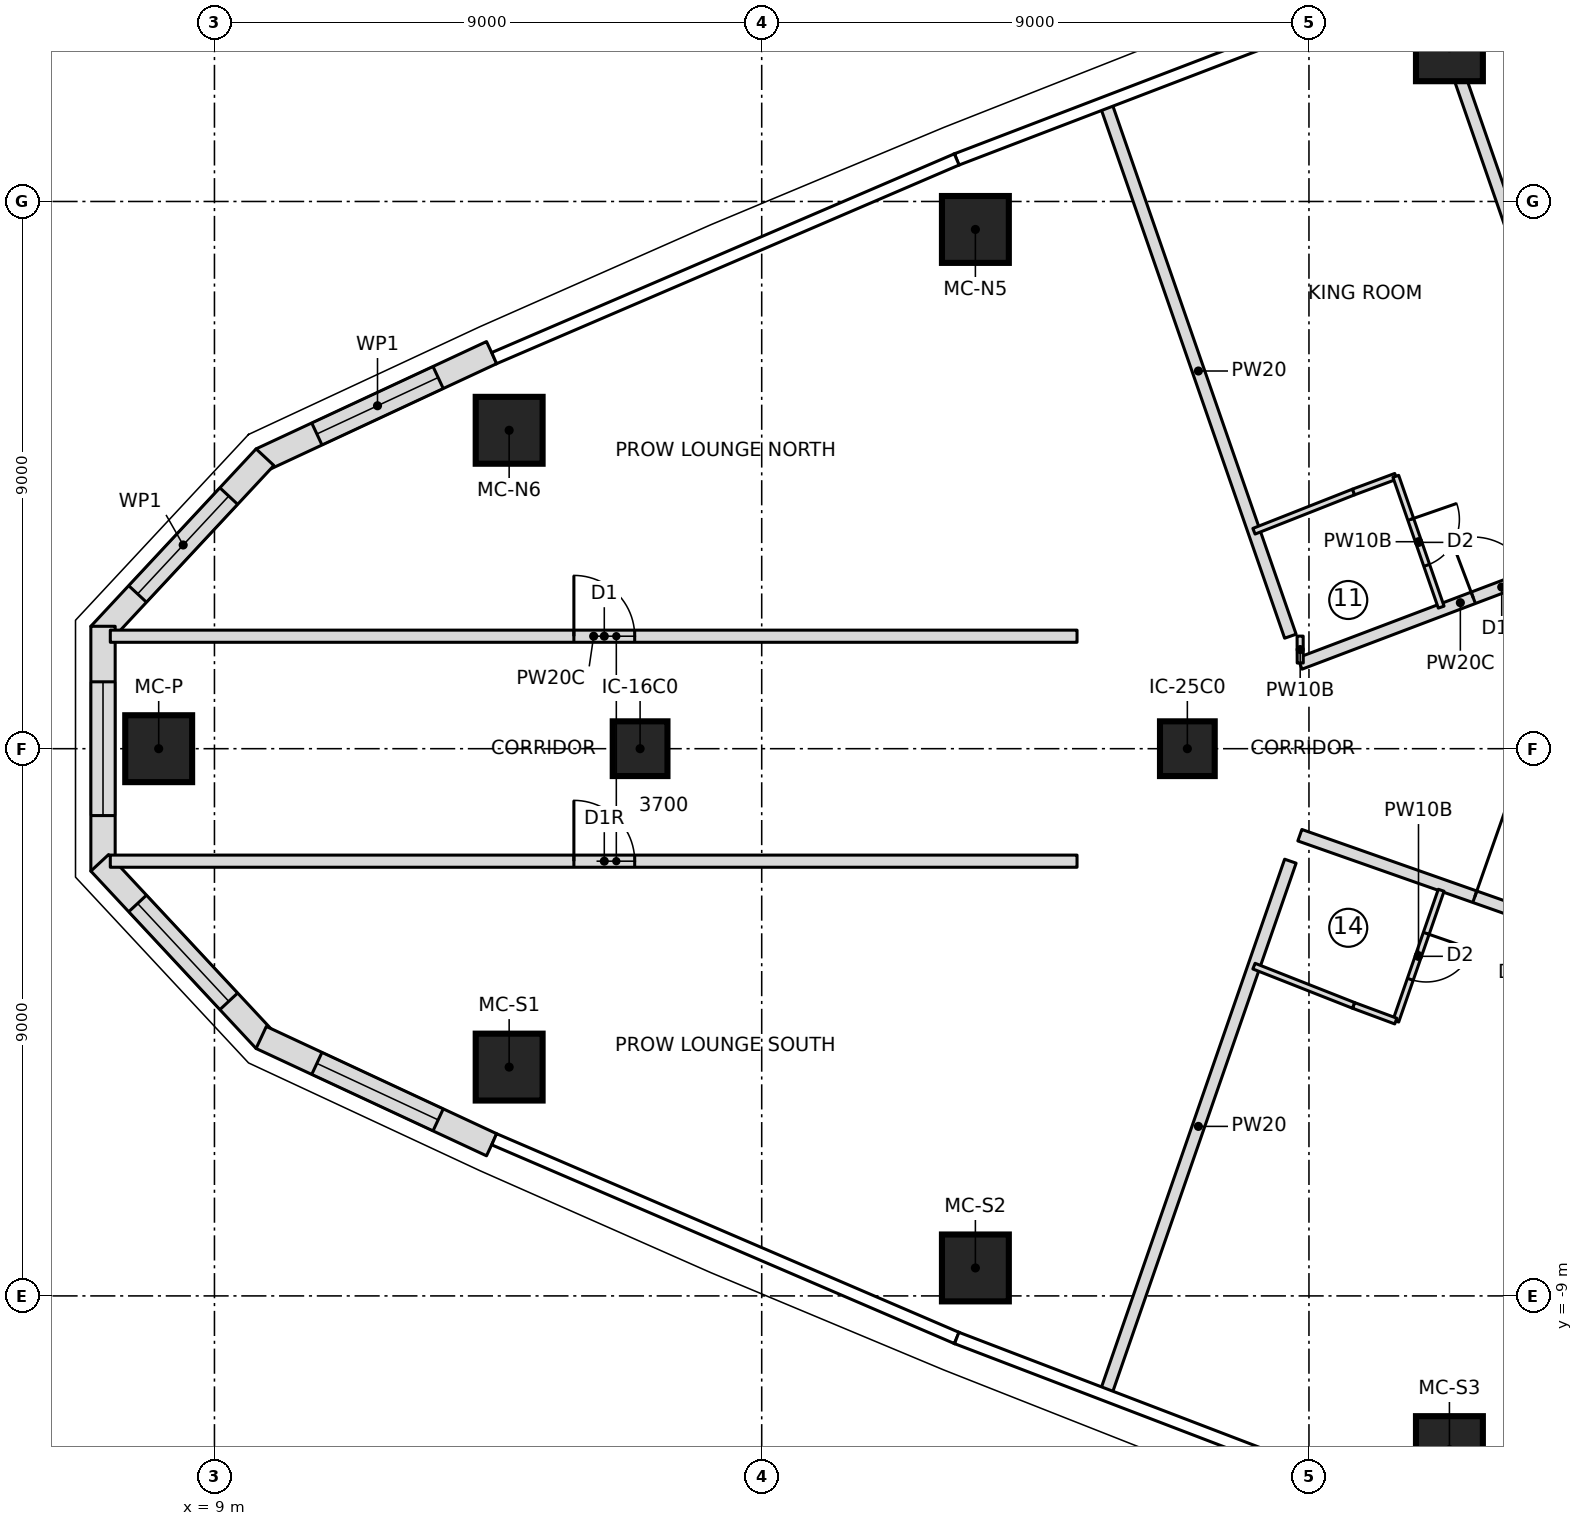
"""IFC4 building model, lengths in metres.
Left out: names, types, materials, properties, quantities, classifications, styles, units other than length and angle.
Written with IfcOpenShell. Run it as: python <this file> out.ifc"""

import sys

from ifc_helpers import new_model, si_unit, direction, frame, frame_2d, origin, origin_2d, place, context, subcontext, project, spatial, polyline, rectangle, outline, extrude, element, fill, save


model = new_model("IFC4")
c1 = context("Model", 3, precision=1e-05, world=origin(), true_north=direction((0.0, 1.0)))
c2 = subcontext(c1, "Body", "Model", "MODEL_VIEW")
j1 = project(units=[si_unit("LENGTHUNIT", "METRE"), si_unit("PLANEANGLEUNIT", "RADIAN")], contexts=[c1])
p1 = place(None, origin())
s1 = spatial("IfcSite", under=j1, at=p1, CompositionType="ELEMENT")
p2 = place(p1, origin())
s2 = spatial("IfcBuilding", under=s1, at=p2, CompositionType="ELEMENT")
p3 = place(p2, frame((0.0, 0.0, 285.65)))
s3 = spatial("IfcBuildingStorey", under=s2, at=p3, CompositionType="ELEMENT", Elevation=285.65)
for number, where, z_axis, x_axis in (
    (1, (8.083, 0.0, 0.0), (0.0, 0.0, 1.0), (1.0, 0.0, 0.0)),
    (2, (13.846, -5.237, 0.0), (0.0, 0.0, 1.0), (1.0, 0.0, 0.0)),
    (3, (21.514, -8.54, 0.0), (0.0, 0.0, 1.0), (1.0, 0.0, 0.0)),
    (4, (29.31, -11.528, 0.0), (0.0, 0.0, 1.0), (1.0, 0.0, 0.0)),
    (5, (29.31, 11.528, 0.0), (0.0, 0.0, 1.0), (1.0, 0.0, 0.0)),
    (6, (21.514, 8.54, 0.0), (0.0, 0.0, 1.0), (1.0, 0.0, 0.0)),
    (7, (13.846, 5.237, 0.0), (0.0, 0.0, 1.0), (1.0, 0.0, 0.0)),
):
    element("IfcColumn", number, at=place(p3, frame(where, z_axis=z_axis, x_axis=x_axis)), inside=s3, PredefinedType="COLUMN", context=c2, shape_type="SweptSolid", body=[
        extrude(rectangle(XDim=1.1, YDim=1.1, at=origin_2d()), origin(), (0.0, 0.0, 1.0), 3.55),
    ])
for number, where, z_axis, x_axis in (
    (8, (16.0, 0.0, 0.0), (0.0, 0.0, 1.0), (1.0, 0.0, 0.0)),
    (9, (25.0, 0.0, 0.0), (0.0, 0.0, 1.0), (1.0, 0.0, 0.0)),
):
    element("IfcColumn", number, at=place(p3, frame(where, z_axis=z_axis, x_axis=x_axis)), inside=s3, PredefinedType="COLUMN", context=c2, shape_type="SweptSolid", body=[
        extrude(rectangle(XDim=0.9, YDim=0.9, at=origin_2d()), origin(), (0.0, 0.0, 1.0), 3.55),
    ])
p4 = place(p3, frame((13.559, 6.515, 0.0), z_axis=(0.0, 0.0, 1.0), x_axis=(-0.906485602396, -0.42223672584, 0.0)))
e10 = element("IfcWall", 10, at=p4, inside=s3, PredefinedType="NOTDEFINED", context=c2, shape_type="SweptSolid", body=[
    extrude(outline(polyline([(0.0, -0.2), (4.181, -0.2), (4.103, 0.2), (0.0, 0.2), (0.0, -0.2)])), origin(), (0.0, 0.0, 1.0), 3.25),
])
p5 = place(p4, frame((0.971, 0.0, 0.6)))
e11 = element("IfcOpeningElement", 11, at=p5, cuts=e10, PredefinedType="OPENING", context=c2, shape_type="SweptSolid", body=[
    extrude(outline(polyline([(0.0, 1.35), (0.084, 1.771), (0.322, 2.128), (0.679, 2.366), (1.1, 2.45), (1.521, 2.366), (1.878, 2.128), (2.116, 1.771), (2.2, 1.35), (2.2, 1.1), (2.116, 0.679), (1.878, 0.322), (1.521, 0.084), (1.1, 0.0), (0.679, 0.084), (0.322, 0.322), (0.084, 0.679), (0.0, 1.1), (0.0, 1.35)])), frame((0.0, 0.21, 0.0), z_axis=(0.0, -1.0, 0.0), x_axis=(1.0, 0.0, 0.0)), (0.0, 0.0, 1.0), 0.42),
])
p6 = place(p3, frame((9.804, 4.766, 0.0), z_axis=(0.0, 0.0, 1.0), x_axis=(-0.6815467277, -0.73177459505, 0.0)))
e12 = element("IfcWall", 12, at=p6, inside=s3, PredefinedType="NOTDEFINED", context=c2, shape_type="SweptSolid", body=[
    extrude(outline(polyline([(-0.039, -0.2), (3.948, -0.2), (3.791, 0.2), (0.039, 0.2), (-0.039, -0.2)])), origin(), (0.0, 0.0, 1.0), 3.25),
])
p7 = place(p6, frame((0.835, 0.0, 0.6)))
e13 = element("IfcOpeningElement", 13, at=p7, cuts=e12, PredefinedType="OPENING", context=c2, shape_type="SweptSolid", body=[
    extrude(outline(polyline([(0.0, 1.35), (0.084, 1.771), (0.322, 2.128), (0.679, 2.366), (1.1, 2.45), (1.521, 2.366), (1.878, 2.128), (2.116, 1.771), (2.2, 1.35), (2.2, 1.1), (2.116, 0.679), (1.878, 0.322), (1.521, 0.084), (1.1, 0.0), (0.679, 0.084), (0.322, 0.322), (0.084, 0.679), (0.0, 1.1), (0.0, 1.35)])), frame((0.0, 0.21, 0.0), z_axis=(0.0, -1.0, 0.0), x_axis=(1.0, 0.0, 0.0)), (0.0, 0.0, 1.0), 0.42),
])
p8 = place(p3, frame((7.167, 1.935, 0.0), z_axis=(0.0, 0.0, 1.0), x_axis=(0.0, -1.0, 0.0)))
e14 = element("IfcWall", 14, at=p8, inside=s3, PredefinedType="NOTDEFINED", context=c2, shape_type="SweptSolid", body=[
    extrude(outline(polyline([(-0.079, -0.2), (3.948, -0.2), (3.791, 0.2), (0.079, 0.2), (-0.079, -0.2)])), origin(), (0.0, 0.0, 1.0), 3.25),
])
p9 = place(p8, frame((0.835, 0.0, 0.6)))
e15 = element("IfcOpeningElement", 15, at=p9, cuts=e14, PredefinedType="OPENING", context=c2, shape_type="SweptSolid", body=[
    extrude(outline(polyline([(0.0, 1.35), (0.084, 1.771), (0.322, 2.128), (0.679, 2.366), (1.1, 2.45), (1.521, 2.366), (1.878, 2.128), (2.116, 1.771), (2.2, 1.35), (2.2, 1.1), (2.116, 0.679), (1.878, 0.322), (1.521, 0.084), (1.1, 0.0), (0.679, 0.084), (0.322, 0.322), (0.084, 0.679), (0.0, 1.1), (0.0, 1.35)])), frame((0.0, 0.21, 0.0), z_axis=(0.0, -1.0, 0.0), x_axis=(1.0, 0.0, 0.0)), (0.0, 0.0, 1.0), 0.42),
])
p10 = place(p3, frame((7.167, -1.935, 0.0), z_axis=(0.0, 0.0, 1.0), x_axis=(0.6815467277, -0.73177459505, 0.0)))
e16 = element("IfcWall", 16, at=p10, inside=s3, PredefinedType="NOTDEFINED", context=c2, shape_type="SweptSolid", body=[
    extrude(outline(polyline([(-0.079, -0.2), (3.908, -0.2), (3.83, 0.2), (0.079, 0.2), (-0.079, -0.2)])), origin(), (0.0, 0.0, 1.0), 3.25),
])
p11 = place(p10, frame((0.835, 0.0, 0.6)))
e17 = element("IfcOpeningElement", 17, at=p11, cuts=e16, PredefinedType="OPENING", context=c2, shape_type="SweptSolid", body=[
    extrude(outline(polyline([(0.0, 1.35), (0.084, 1.771), (0.322, 2.128), (0.679, 2.366), (1.1, 2.45), (1.521, 2.366), (1.878, 2.128), (2.116, 1.771), (2.2, 1.35), (2.2, 1.1), (2.116, 0.679), (1.878, 0.322), (1.521, 0.084), (1.1, 0.0), (0.679, 0.084), (0.322, 0.322), (0.084, 0.679), (0.0, 1.1), (0.0, 1.35)])), frame((0.0, 0.21, 0.0), z_axis=(0.0, -1.0, 0.0), x_axis=(1.0, 0.0, 0.0)), (0.0, 0.0, 1.0), 0.42),
])
p12 = place(p3, frame((9.804, -4.766, 0.0), z_axis=(0.0, 0.0, 1.0), x_axis=(0.906485602396, -0.42223672584, 0.0)))
e18 = element("IfcWall", 18, at=p12, inside=s3, PredefinedType="NOTDEFINED", context=c2, shape_type="SweptSolid", body=[
    extrude(outline(polyline([(-0.039, -0.2), (4.142, -0.2), (4.142, 0.2), (0.039, 0.2), (-0.039, -0.2)])), origin(), (0.0, 0.0, 1.0), 3.25),
])
p13 = place(p12, frame((0.971, 0.0, 0.6)))
e19 = element("IfcOpeningElement", 19, at=p13, cuts=e18, PredefinedType="OPENING", context=c2, shape_type="SweptSolid", body=[
    extrude(outline(polyline([(0.0, 1.35), (0.084, 1.771), (0.322, 2.128), (0.679, 2.366), (1.1, 2.45), (1.521, 2.366), (1.878, 2.128), (2.116, 1.771), (2.2, 1.35), (2.2, 1.1), (2.116, 0.679), (1.878, 0.322), (1.521, 0.084), (1.1, 0.0), (0.679, 0.084), (0.322, 0.322), (0.084, 0.679), (0.0, 1.1), (0.0, 1.35)])), frame((0.0, 0.21, 0.0), z_axis=(0.0, -1.0, 0.0), x_axis=(1.0, 0.0, 0.0)), (0.0, 0.0, 1.0), 0.42),
])
p14 = place(p3, frame((7.287, 1.85, 0.0), z_axis=(0.0, 0.0, 1.0), x_axis=(1.0, 0.0, 0.0)))
e20 = element("IfcWall", 20, at=p14, inside=s3, PredefinedType="PARTITIONING", context=c2, shape_type="SweptSolid", body=[
    extrude(rectangle(XDim=15.899, YDim=0.2, at=frame_2d((7.949, 0.0))), origin(), (0.0, 0.0, 1.0), 3.25),
])
p15 = place(p14, frame((7.624, 0.0, 0.0)))
e21 = element("IfcOpeningElement", 21, at=p15, cuts=e20, PredefinedType="OPENING", context=c2, shape_type="SweptSolid", body=[
    extrude(rectangle(XDim=1.0, YDim=2.1, at=frame_2d((0.5, 1.05))), frame((0.0, 0.11, 0.0), z_axis=(0.0, -1.0, 0.0), x_axis=(1.0, 0.0, 0.0)), (0.0, 0.0, 1.0), 0.22),
])
p16 = place(p3, frame((7.287, -1.85, 0.0), z_axis=(0.0, 0.0, 1.0), x_axis=(1.0, 0.0, 0.0)))
e22 = element("IfcWall", 22, at=p16, inside=s3, PredefinedType="PARTITIONING", context=c2, shape_type="SweptSolid", body=[
    extrude(rectangle(XDim=15.899, YDim=0.2, at=frame_2d((7.949, 0.0))), origin(), (0.0, 0.0, 1.0), 3.25),
])
p17 = place(p16, frame((7.624, 0.0, 0.0)))
e23 = element("IfcOpeningElement", 23, at=p17, cuts=e22, PredefinedType="OPENING", context=c2, shape_type="SweptSolid", body=[
    extrude(rectangle(XDim=1.0, YDim=2.1, at=frame_2d((0.5, 1.05))), frame((0.0, 0.11, 0.0), z_axis=(0.0, -1.0, 0.0), x_axis=(1.0, 0.0, 0.0)), (0.0, 0.0, 1.0), 0.22),
])
p18 = place(p3, frame((26.694, 1.85, 0.0), z_axis=(0.0, 0.0, 1.0), x_axis=(-0.327714422317, 0.944776829418, 0.0)))
e24 = element("IfcWall", 24, at=p18, inside=s3, PredefinedType="PARTITIONING", context=c2, shape_type="SweptSolid", body=[
    extrude(rectangle(XDim=9.233, YDim=0.2, at=frame_2d((4.617, 0.0))), origin(), (0.0, 0.0, 1.0), 3.25),
])
p19 = place(p3, frame((26.85, 1.401, 0.0), z_axis=(0.0, 0.0, 1.0), x_axis=(0.935181367748, 0.354169181912, 0.0)))
e25 = element("IfcWall", 25, at=p19, inside=s3, PredefinedType="PARTITIONING", context=c2, shape_type="SweptSolid", body=[
    extrude(rectangle(XDim=5.645, YDim=0.2, at=frame_2d((2.823, 0.0))), origin(), (0.0, 0.0, 1.0), 3.25),
])
p20 = place(p19, frame((3.05, 0.0, 0.0)))
e26 = element("IfcOpeningElement", 26, at=p20, cuts=e25, PredefinedType="OPENING", context=c2, shape_type="SweptSolid", body=[
    extrude(rectangle(XDim=1.0, YDim=2.1, at=frame_2d((0.5, 1.05))), frame((0.0, 0.11, 0.0), z_axis=(0.0, -1.0, 0.0), x_axis=(1.0, 0.0, 0.0)), (0.0, 0.0, 1.0), 0.22),
])
p21 = place(p3, frame((26.096, 3.576, 0.0), z_axis=(0.0, 0.0, 1.0), x_axis=(0.930254925629, 0.366913850028, 0.0)))
e27 = element("IfcWall", 27, at=p21, inside=s3, PredefinedType="PARTITIONING", context=c2, shape_type="SweptSolid", body=[
    extrude(rectangle(XDim=1.76, YDim=0.1, at=frame_2d((0.88, 0.0))), origin(), (0.0, 0.0, 1.0), 3.25),
])
p22 = place(p3, frame((27.733, 4.222, 0.0), z_axis=(0.0, 0.0, 1.0), x_axis=(0.937514267289, 0.347946833049, 0.0)))
e28 = element("IfcWall", 28, at=p22, inside=s3, PredefinedType="PARTITIONING", context=c2, shape_type="SweptSolid", body=[
    extrude(rectangle(XDim=0.742, YDim=0.1, at=frame_2d((0.371, 0.0))), origin(), (0.0, 0.0, 1.0), 3.25),
])
p23 = place(p3, frame((28.428, 4.48, 0.0), z_axis=(0.0, 0.0, 1.0), x_axis=(0.327718024288, -0.944775579996, 0.0)))
e29 = element("IfcWall", 29, at=p23, inside=s3, PredefinedType="PARTITIONING", context=c2, shape_type="SweptSolid", body=[
    extrude(rectangle(XDim=2.277, YDim=0.1, at=frame_2d((1.139, 0.0))), origin(), (0.0, 0.0, 1.0), 3.25),
])
p24 = place(p23, frame((0.75, 0.0, 0.0)))
e30 = element("IfcOpeningElement", 30, at=p24, cuts=e29, PredefinedType="OPENING", context=c2, shape_type="SweptSolid", body=[
    extrude(rectangle(XDim=0.8, YDim=2.1, at=frame_2d((0.4, 1.05))), frame((0.0, 0.06, 0.0), z_axis=(0.0, -1.0, 0.0), x_axis=(1.0, 0.0, 0.0)), (0.0, 0.0, 1.0), 0.12),
])
p25 = place(p3, frame((32.129, 3.401, 0.0), z_axis=(0.0, 0.0, 1.0), x_axis=(-0.327724115377, 0.944773467134, 0.0)))
e31 = element("IfcWall", 31, at=p25, inside=s3, PredefinedType="PARTITIONING", context=c2, shape_type="SweptSolid", body=[
    extrude(rectangle(XDim=9.702, YDim=0.2, at=frame_2d((4.851, 0.0))), origin(), (0.0, 0.0, 1.0), 3.25),
])
p26 = place(p3, frame((23.668, -10.573, 0.0), z_axis=(0.0, 0.0, 1.0), x_axis=(0.327714422317, 0.944776829418, 0.0)))
e32 = element("IfcWall", 32, at=p26, inside=s3, PredefinedType="PARTITIONING", context=c2, shape_type="SweptSolid", body=[
    extrude(rectangle(XDim=9.233, YDim=0.2, at=frame_2d((4.617, 0.0))), origin(), (0.0, 0.0, 1.0), 3.25),
])
p27 = place(p3, frame((26.85, -1.423, 0.0), z_axis=(0.0, 0.0, 1.0), x_axis=(0.943328585164, -0.331860182022, 0.0)))
e33 = element("IfcWall", 33, at=p27, inside=s3, PredefinedType="PARTITIONING", context=c2, shape_type="SweptSolid", body=[
    extrude(rectangle(XDim=13.984, YDim=0.2, at=frame_2d((6.992, 0.0))), origin(), (0.0, 0.0, 1.0), 3.25),
])
p28 = place(p27, frame((3.05, 0.0, 0.0)))
e34 = element("IfcOpeningElement", 34, at=p28, cuts=e33, PredefinedType="OPENING", context=c2, shape_type="SweptSolid", body=[
    extrude(rectangle(XDim=1.5, YDim=2.1, at=frame_2d((0.75, 1.05))), frame((0.0, 0.11, 0.0), z_axis=(0.0, -1.0, 0.0), x_axis=(1.0, 0.0, 0.0)), (0.0, 0.0, 1.0), 0.22),
])
p29 = place(p3, frame((29.175, -2.328, 0.0), z_axis=(0.0, 0.0, 1.0), x_axis=(-0.327718024288, -0.944775579996, 0.0)))
e35 = element("IfcWall", 35, at=p29, inside=s3, PredefinedType="PARTITIONING", context=c2, shape_type="SweptSolid", body=[
    extrude(rectangle(XDim=2.277, YDim=0.1, at=frame_2d((1.139, 0.0))), origin(), (0.0, 0.0, 1.0), 3.25),
])
p30 = place(p29, frame((0.75, 0.0, 0.0)))
e36 = element("IfcOpeningElement", 36, at=p30, cuts=e35, PredefinedType="OPENING", context=c2, shape_type="SweptSolid", body=[
    extrude(rectangle(XDim=0.8, YDim=2.1, at=frame_2d((0.4, 1.05))), frame((0.0, 0.06, 0.0), z_axis=(0.0, -1.0, 0.0), x_axis=(1.0, 0.0, 0.0)), (0.0, 0.0, 1.0), 0.12),
])
p31 = place(p3, frame((28.428, -4.48, 0.0), z_axis=(0.0, 0.0, 1.0), x_axis=(-0.937514267289, 0.347946833049, 0.0)))
e37 = element("IfcWall", 37, at=p31, inside=s3, PredefinedType="PARTITIONING", context=c2, shape_type="SweptSolid", body=[
    extrude(rectangle(XDim=0.742, YDim=0.1, at=frame_2d((0.371, 0.0))), origin(), (0.0, 0.0, 1.0), 3.25),
])
p32 = place(p3, frame((27.733, -4.222, 0.0), z_axis=(0.0, 0.0, 1.0), x_axis=(-0.930254925629, 0.366913850028, 0.0)))
e38 = element("IfcWall", 38, at=p32, inside=s3, PredefinedType="PARTITIONING", context=c2, shape_type="SweptSolid", body=[
    extrude(rectangle(XDim=1.76, YDim=0.1, at=frame_2d((0.88, 0.0))), origin(), (0.0, 0.0, 1.0), 3.25),
])
p33 = place(p3, frame((26.856, 1.409, 0.0), z_axis=(0.0, 0.0, 1.0), x_axis=(-0.003863105832, 0.999992538179, 0.0)))
e39 = element("IfcWall", 39, at=p33, inside=s3, PredefinedType="PARTITIONING", context=c2, shape_type="SweptSolid", body=[
    extrude(rectangle(XDim=0.442, YDim=0.1, at=frame_2d((0.221, 0.0))), origin(), (0.0, 0.0, 1.0), 3.25),
])
p34 = place(p5, origin())
e40 = element("IfcWindow", 40, at=p34, inside=s3, PartitioningType="SINGLE_PANEL", PredefinedType="WINDOW", context=c2, shape_type="SweptSolid", body=[
    extrude(outline(polyline([(0.0, 1.35), (0.084, 1.771), (0.322, 2.128), (0.679, 2.366), (1.1, 2.45), (1.521, 2.366), (1.878, 2.128), (2.116, 1.771), (2.2, 1.35), (2.2, 1.1), (2.116, 0.679), (1.878, 0.322), (1.521, 0.084), (1.1, 0.0), (0.679, 0.084), (0.322, 0.322), (0.084, 0.679), (0.0, 1.1), (0.0, 1.35)])), frame((0.0, 0.17, 0.0), z_axis=(0.0, -1.0, 0.0), x_axis=(1.0, 0.0, 0.0)), (0.0, 0.0, 1.0), 0.06),
])
fill(e11, e40)
p35 = place(p7, origin())
e41 = element("IfcWindow", 41, at=p35, inside=s3, PartitioningType="SINGLE_PANEL", PredefinedType="WINDOW", context=c2, shape_type="SweptSolid", body=[
    extrude(outline(polyline([(0.0, 1.35), (0.084, 1.771), (0.322, 2.128), (0.679, 2.366), (1.1, 2.45), (1.521, 2.366), (1.878, 2.128), (2.116, 1.771), (2.2, 1.35), (2.2, 1.1), (2.116, 0.679), (1.878, 0.322), (1.521, 0.084), (1.1, 0.0), (0.679, 0.084), (0.322, 0.322), (0.084, 0.679), (0.0, 1.1), (0.0, 1.35)])), frame((0.0, 0.17, 0.0), z_axis=(0.0, -1.0, 0.0), x_axis=(1.0, 0.0, 0.0)), (0.0, 0.0, 1.0), 0.06),
])
fill(e13, e41)
p36 = place(p9, origin())
e42 = element("IfcWindow", 42, at=p36, inside=s3, PartitioningType="SINGLE_PANEL", PredefinedType="WINDOW", context=c2, shape_type="SweptSolid", body=[
    extrude(outline(polyline([(0.0, 1.35), (0.084, 1.771), (0.322, 2.128), (0.679, 2.366), (1.1, 2.45), (1.521, 2.366), (1.878, 2.128), (2.116, 1.771), (2.2, 1.35), (2.2, 1.1), (2.116, 0.679), (1.878, 0.322), (1.521, 0.084), (1.1, 0.0), (0.679, 0.084), (0.322, 0.322), (0.084, 0.679), (0.0, 1.1), (0.0, 1.35)])), frame((0.0, 0.17, 0.0), z_axis=(0.0, -1.0, 0.0), x_axis=(1.0, 0.0, 0.0)), (0.0, 0.0, 1.0), 0.06),
])
fill(e15, e42)
p37 = place(p11, origin())
e43 = element("IfcWindow", 43, at=p37, inside=s3, PartitioningType="SINGLE_PANEL", PredefinedType="WINDOW", context=c2, shape_type="SweptSolid", body=[
    extrude(outline(polyline([(0.0, 1.35), (0.084, 1.771), (0.322, 2.128), (0.679, 2.366), (1.1, 2.45), (1.521, 2.366), (1.878, 2.128), (2.116, 1.771), (2.2, 1.35), (2.2, 1.1), (2.116, 0.679), (1.878, 0.322), (1.521, 0.084), (1.1, 0.0), (0.679, 0.084), (0.322, 0.322), (0.084, 0.679), (0.0, 1.1), (0.0, 1.35)])), frame((0.0, 0.17, 0.0), z_axis=(0.0, -1.0, 0.0), x_axis=(1.0, 0.0, 0.0)), (0.0, 0.0, 1.0), 0.06),
])
fill(e17, e43)
p38 = place(p13, origin())
e44 = element("IfcWindow", 44, at=p38, inside=s3, PartitioningType="SINGLE_PANEL", PredefinedType="WINDOW", context=c2, shape_type="SweptSolid", body=[
    extrude(outline(polyline([(0.0, 1.35), (0.084, 1.771), (0.322, 2.128), (0.679, 2.366), (1.1, 2.45), (1.521, 2.366), (1.878, 2.128), (2.116, 1.771), (2.2, 1.35), (2.2, 1.1), (2.116, 0.679), (1.878, 0.322), (1.521, 0.084), (1.1, 0.0), (0.679, 0.084), (0.322, 0.322), (0.084, 0.679), (0.0, 1.1), (0.0, 1.35)])), frame((0.0, 0.17, 0.0), z_axis=(0.0, -1.0, 0.0), x_axis=(1.0, 0.0, 0.0)), (0.0, 0.0, 1.0), 0.06),
])
fill(e19, e44)
p39 = place(p15, origin())
e45 = element("IfcDoor", 45, at=p39, inside=s3, OperationType="SINGLE_SWING_LEFT", PredefinedType="DOOR", context=c2, shape_type="SweptSolid", body=[
    extrude(rectangle(XDim=1.0, YDim=2.1, at=frame_2d((0.5, 1.05))), frame((0.0, 0.025, 0.0), z_axis=(0.0, -1.0, 0.0), x_axis=(1.0, 0.0, 0.0)), (0.0, 0.0, 1.0), 0.05),
])
fill(e21, e45)
p40 = place(p17, origin())
e46 = element("IfcDoor", 46, at=p40, inside=s3, OperationType="SINGLE_SWING_RIGHT", PredefinedType="DOOR", context=c2, shape_type="SweptSolid", body=[
    extrude(rectangle(XDim=1.0, YDim=2.1, at=frame_2d((0.5, 1.05))), frame((0.0, 0.025, 0.0), z_axis=(0.0, -1.0, 0.0), x_axis=(1.0, 0.0, 0.0)), (0.0, 0.0, 1.0), 0.05),
])
fill(e23, e46)
p41 = place(p24, origin())
e47 = element("IfcDoor", 47, at=p41, inside=s3, OperationType="SINGLE_SWING_LEFT", PredefinedType="DOOR", context=c2, shape_type="SweptSolid", body=[
    extrude(rectangle(XDim=0.8, YDim=2.1, at=frame_2d((0.4, 1.05))), frame((0.0, 0.025, 0.0), z_axis=(0.0, -1.0, 0.0), x_axis=(1.0, 0.0, 0.0)), (0.0, 0.0, 1.0), 0.05),
])
fill(e30, e47)
p42 = place(p20, origin())
e48 = element("IfcDoor", 48, at=p42, inside=s3, OperationType="SINGLE_SWING_RIGHT", PredefinedType="DOOR", context=c2, shape_type="SweptSolid", body=[
    extrude(rectangle(XDim=1.0, YDim=2.1, at=frame_2d((0.5, 1.05))), frame((0.0, 0.025, 0.0), z_axis=(0.0, -1.0, 0.0), x_axis=(1.0, 0.0, 0.0)), (0.0, 0.0, 1.0), 0.05),
])
fill(e26, e48)
p43 = place(p30, origin())
e49 = element("IfcDoor", 49, at=p43, inside=s3, OperationType="SINGLE_SWING_LEFT", PredefinedType="DOOR", context=c2, shape_type="SweptSolid", body=[
    extrude(rectangle(XDim=0.8, YDim=2.1, at=frame_2d((0.4, 1.05))), frame((0.0, 0.025, 0.0), z_axis=(0.0, -1.0, 0.0), x_axis=(1.0, 0.0, 0.0)), (0.0, 0.0, 1.0), 0.05),
])
fill(e36, e49)
p44 = place(p28, origin())
e50 = element("IfcDoor", 50, at=p44, inside=s3, OperationType="DOUBLE_DOOR_SINGLE_SWING", PredefinedType="DOOR", context=c2, shape_type="SweptSolid", body=[
    extrude(rectangle(XDim=1.5, YDim=2.1, at=frame_2d((0.75, 1.05))), frame((0.0, 0.025, 0.0), z_axis=(0.0, -1.0, 0.0), x_axis=(1.0, 0.0, 0.0)), (0.0, 0.0, 1.0), 0.05),
])
fill(e34, e50)
save(model, sys.argv[1])
